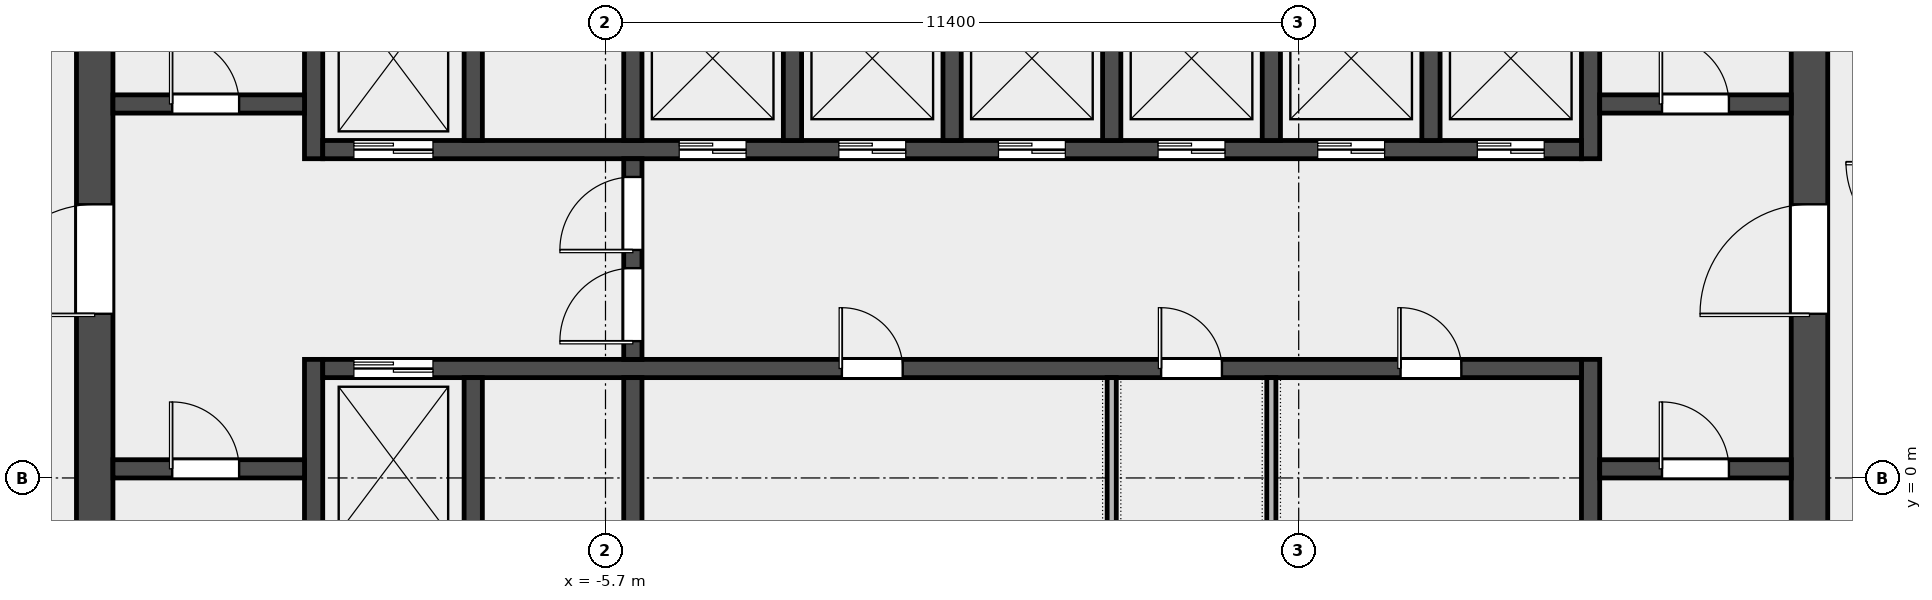
"""IFC4 building model, lengths in metres.
Left out: names, types, materials, properties, quantities, classifications, styles, units other than length and angle.
Written with IfcOpenShell. Run it as: python <this file> out.ifc"""

import sys

from ifc_helpers import new_model, si_unit, direction, frame, frame_2d, origin, place, context, subcontext, project, spatial, rectangle, extrude, element, fill, save


model = new_model("IFC4")
c1 = context("Model", 3, precision=1e-05, world=origin(), true_north=direction((0.0, 1.0)))
c2 = subcontext(c1, "Body", "Model", "MODEL_VIEW")
j1 = project(units=[si_unit("LENGTHUNIT", "METRE"), si_unit("PLANEANGLEUNIT", "RADIAN")], contexts=[c1])
p1 = place(None, origin())
s1 = spatial("IfcSite", under=j1, at=p1, CompositionType="ELEMENT")
p2 = place(p1, origin())
s2 = spatial("IfcBuilding", under=s1, at=p2, CompositionType="ELEMENT")
p3 = place(p2, frame((0.0, 0.0, 299.4)))
s3 = spatial("IfcBuildingStorey", under=s2, at=p3, CompositionType="ELEMENT", Elevation=299.4)
p4 = place(p3, frame((-14.1, -6.6, 0.0), z_axis=(0.0, 0.0, 1.0), x_axis=(0.0, 1.0, 0.0)))
e1 = element("IfcWall", 1, at=p4, inside=s3, PredefinedType="SHEAR", context=c2, shape_type="SweptSolid", body=[
    extrude(rectangle(XDim=19.5, YDim=0.6, at=frame_2d((9.75, 0.0))), origin(), (0.0, 0.0, 1.0), 3.7),
])
p5 = place(p4, frame((9.3, 0.0, 0.0)))
e2 = element("IfcOpeningElement", 2, at=p5, cuts=e1, PredefinedType="OPENING", context=c2, shape_type="SweptSolid", body=[
    extrude(rectangle(XDim=1.8, YDim=2.1, at=frame_2d((0.9, 1.05))), frame((0.0, 0.312, 0.0), z_axis=(0.0, -1.0, 0.0), x_axis=(1.0, 0.0, 0.0)), (0.0, 0.0, 1.0), 0.624),
])
p6 = place(p3, frame((14.1, -6.6, 0.0), z_axis=(0.0, 0.0, 1.0), x_axis=(0.0, 1.0, 0.0)))
e3 = element("IfcWall", 3, at=p6, inside=s3, PredefinedType="SHEAR", context=c2, shape_type="SweptSolid", body=[
    extrude(rectangle(XDim=19.5, YDim=0.6, at=frame_2d((9.75, 0.0))), origin(), (0.0, 0.0, 1.0), 3.7),
])
p7 = place(p6, frame((9.3, 0.0, 0.0)))
e4 = element("IfcOpeningElement", 4, at=p7, cuts=e3, PredefinedType="OPENING", context=c2, shape_type="SweptSolid", body=[
    extrude(rectangle(XDim=1.8, YDim=2.1, at=frame_2d((0.9, 1.05))), frame((0.0, 0.312, 0.0), z_axis=(0.0, -1.0, 0.0), x_axis=(1.0, 0.0, 0.0)), (0.0, 0.0, 1.0), 0.624),
])
p8 = place(p3, frame((-10.5, -6.6, 0.0), z_axis=(0.0, 0.0, 1.0), x_axis=(0.0, 1.0, 0.0)))
e5 = element("IfcWall", 5, at=p8, inside=s3, PredefinedType="SHEAR", context=c2, shape_type="SweptSolid", body=[
    extrude(rectangle(XDim=8.55, YDim=0.3, at=frame_2d((4.275, 0.0))), origin(), (0.0, 0.0, 1.0), 3.7),
])
p9 = place(p3, frame((-10.5, 5.25, 0.0), z_axis=(0.0, 0.0, 1.0), x_axis=(0.0, 1.0, 0.0)))
e6 = element("IfcWall", 6, at=p9, inside=s3, PredefinedType="SHEAR", context=c2, shape_type="SweptSolid", body=[
    extrude(rectangle(XDim=7.65, YDim=0.3, at=frame_2d((3.825, 0.0))), origin(), (0.0, 0.0, 1.0), 3.7),
])
p10 = place(p3, frame((10.5, -6.6, 0.0), z_axis=(0.0, 0.0, 1.0), x_axis=(0.0, 1.0, 0.0)))
e7 = element("IfcWall", 7, at=p10, inside=s3, PredefinedType="SHEAR", context=c2, shape_type="SweptSolid", body=[
    extrude(rectangle(XDim=8.55, YDim=0.3, at=frame_2d((4.275, 0.0))), origin(), (0.0, 0.0, 1.0), 3.7),
])
p11 = place(p3, frame((10.5, 5.25, 0.0), z_axis=(0.0, 0.0, 1.0), x_axis=(0.0, 1.0, 0.0)))
e8 = element("IfcWall", 8, at=p11, inside=s3, PredefinedType="SHEAR", context=c2, shape_type="SweptSolid", body=[
    extrude(rectangle(XDim=7.65, YDim=0.3, at=frame_2d((3.825, 0.0))), origin(), (0.0, 0.0, 1.0), 3.7),
])
p12 = place(p3, frame((-13.8, 0.15, 0.0), z_axis=(0.0, 0.0, 1.0), x_axis=(1.0, 0.0, 0.0)))
e9 = element("IfcWall", 9, at=p12, inside=s3, PredefinedType="SOLIDWALL", context=c2, shape_type="SweptSolid", body=[
    extrude(rectangle(XDim=3.15, YDim=0.3, at=frame_2d((1.575, 0.0))), origin(), (0.0, 0.0, 1.0), 3.7),
])
p13 = place(p12, frame((0.975, 0.0, 0.0)))
e10 = element("IfcOpeningElement", 10, at=p13, cuts=e9, PredefinedType="OPENING", context=c2, shape_type="SweptSolid", body=[
    extrude(rectangle(XDim=1.1, YDim=2.1, at=frame_2d((0.55, 1.05))), frame((0.0, 0.162, 0.0), z_axis=(0.0, -1.0, 0.0), x_axis=(1.0, 0.0, 0.0)), (0.0, 0.0, 1.0), 0.324),
])
p14 = place(p3, frame((-13.8, 6.15, 0.0), z_axis=(0.0, 0.0, 1.0), x_axis=(1.0, 0.0, 0.0)))
e11 = element("IfcWall", 11, at=p14, inside=s3, PredefinedType="SOLIDWALL", context=c2, shape_type="SweptSolid", body=[
    extrude(rectangle(XDim=3.15, YDim=0.3, at=frame_2d((1.575, 0.0))), origin(), (0.0, 0.0, 1.0), 3.7),
])
p15 = place(p14, frame((0.975, 0.0, 0.0)))
e12 = element("IfcOpeningElement", 12, at=p15, cuts=e11, PredefinedType="OPENING", context=c2, shape_type="SweptSolid", body=[
    extrude(rectangle(XDim=1.1, YDim=2.1, at=frame_2d((0.55, 1.05))), frame((0.0, 0.162, 0.0), z_axis=(0.0, -1.0, 0.0), x_axis=(1.0, 0.0, 0.0)), (0.0, 0.0, 1.0), 0.324),
])
p16 = place(p3, frame((10.65, 0.15, 0.0), z_axis=(0.0, 0.0, 1.0), x_axis=(1.0, 0.0, 0.0)))
e13 = element("IfcWall", 13, at=p16, inside=s3, PredefinedType="SOLIDWALL", context=c2, shape_type="SweptSolid", body=[
    extrude(rectangle(XDim=3.15, YDim=0.3, at=frame_2d((1.575, 0.0))), origin(), (0.0, 0.0, 1.0), 3.7),
])
p17 = place(p16, frame((1.025, 0.0, 0.0)))
e14 = element("IfcOpeningElement", 14, at=p17, cuts=e13, PredefinedType="OPENING", context=c2, shape_type="SweptSolid", body=[
    extrude(rectangle(XDim=1.1, YDim=2.1, at=frame_2d((0.55, 1.05))), frame((0.0, 0.162, 0.0), z_axis=(0.0, -1.0, 0.0), x_axis=(1.0, 0.0, 0.0)), (0.0, 0.0, 1.0), 0.324),
])
p18 = place(p3, frame((10.65, 6.15, 0.0), z_axis=(0.0, 0.0, 1.0), x_axis=(1.0, 0.0, 0.0)))
e15 = element("IfcWall", 15, at=p18, inside=s3, PredefinedType="SOLIDWALL", context=c2, shape_type="SweptSolid", body=[
    extrude(rectangle(XDim=3.15, YDim=0.3, at=frame_2d((1.575, 0.0))), origin(), (0.0, 0.0, 1.0), 3.7),
])
p19 = place(p18, frame((1.025, 0.0, 0.0)))
e16 = element("IfcOpeningElement", 16, at=p19, cuts=e15, PredefinedType="OPENING", context=c2, shape_type="SweptSolid", body=[
    extrude(rectangle(XDim=1.1, YDim=2.1, at=frame_2d((0.55, 1.05))), frame((0.0, 0.162, 0.0), z_axis=(0.0, -1.0, 0.0), x_axis=(1.0, 0.0, 0.0)), (0.0, 0.0, 1.0), 0.324),
])
p20 = place(p3, frame((-10.35, 1.8, 0.0), z_axis=(0.0, 0.0, 1.0), x_axis=(1.0, 0.0, 0.0)))
e17 = element("IfcWall", 17, at=p20, inside=s3, PredefinedType="SOLIDWALL", context=c2, shape_type="SweptSolid", body=[
    extrude(rectangle(XDim=20.7, YDim=0.3, at=frame_2d((10.35, 0.0))), origin(), (0.0, 0.0, 1.0), 3.7),
])
p21 = place(p20, frame((0.512, 0.0, 0.0)))
e18 = element("IfcOpeningElement", 18, at=p21, cuts=e17, PredefinedType="OPENING", context=c2, shape_type="SweptSolid", body=[
    extrude(rectangle(XDim=1.3, YDim=2.1, at=frame_2d((0.65, 1.05))), frame((0.0, 0.162, 0.0), z_axis=(0.0, -1.0, 0.0), x_axis=(1.0, 0.0, 0.0)), (0.0, 0.0, 1.0), 0.324),
])
p22 = place(p20, frame((8.538, 0.0, 0.0)))
e19 = element("IfcOpeningElement", 19, at=p22, cuts=e17, PredefinedType="OPENING", context=c2, shape_type="SweptSolid", body=[
    extrude(rectangle(XDim=1.0, YDim=2.1, at=frame_2d((0.5, 1.05))), frame((0.0, 0.162, 0.0), z_axis=(0.0, -1.0, 0.0), x_axis=(1.0, 0.0, 0.0)), (0.0, 0.0, 1.0), 0.324),
])
p23 = place(p20, frame((13.788, 0.0, 0.0)))
e20 = element("IfcOpeningElement", 20, at=p23, cuts=e17, PredefinedType="OPENING", context=c2, shape_type="SweptSolid", body=[
    extrude(rectangle(XDim=1.0, YDim=2.1, at=frame_2d((0.5, 1.05))), frame((0.0, 0.162, 0.0), z_axis=(0.0, -1.0, 0.0), x_axis=(1.0, 0.0, 0.0)), (0.0, 0.0, 1.0), 0.324),
])
p24 = place(p20, frame((17.725, 0.0, 0.0)))
e21 = element("IfcOpeningElement", 21, at=p24, cuts=e17, PredefinedType="OPENING", context=c2, shape_type="SweptSolid", body=[
    extrude(rectangle(XDim=1.0, YDim=2.1, at=frame_2d((0.5, 1.05))), frame((0.0, 0.162, 0.0), z_axis=(0.0, -1.0, 0.0), x_axis=(1.0, 0.0, 0.0)), (0.0, 0.0, 1.0), 0.324),
])
p25 = place(p3, frame((-10.35, 5.4, 0.0), z_axis=(0.0, 0.0, 1.0), x_axis=(1.0, 0.0, 0.0)))
e22 = element("IfcWall", 22, at=p25, inside=s3, PredefinedType="SOLIDWALL", context=c2, shape_type="SweptSolid", body=[
    extrude(rectangle(XDim=20.7, YDim=0.3, at=frame_2d((10.35, 0.0))), origin(), (0.0, 0.0, 1.0), 3.7),
])
p26 = place(p25, frame((0.512, 0.0, 0.0)))
e23 = element("IfcOpeningElement", 23, at=p26, cuts=e22, PredefinedType="OPENING", context=c2, shape_type="SweptSolid", body=[
    extrude(rectangle(XDim=1.3, YDim=2.1, at=frame_2d((0.65, 1.05))), frame((0.0, 0.162, 0.0), z_axis=(0.0, -1.0, 0.0), x_axis=(1.0, 0.0, 0.0)), (0.0, 0.0, 1.0), 0.324),
])
p27 = place(p25, frame((5.863, 0.0, 0.0)))
e24 = element("IfcOpeningElement", 24, at=p27, cuts=e22, PredefinedType="OPENING", context=c2, shape_type="SweptSolid", body=[
    extrude(rectangle(XDim=1.1, YDim=2.1, at=frame_2d((0.55, 1.05))), frame((0.0, 0.162, 0.0), z_axis=(0.0, -1.0, 0.0), x_axis=(1.0, 0.0, 0.0)), (0.0, 0.0, 1.0), 0.324),
])
p28 = place(p25, frame((8.488, 0.0, 0.0)))
e25 = element("IfcOpeningElement", 25, at=p28, cuts=e22, PredefinedType="OPENING", context=c2, shape_type="SweptSolid", body=[
    extrude(rectangle(XDim=1.1, YDim=2.1, at=frame_2d((0.55, 1.05))), frame((0.0, 0.162, 0.0), z_axis=(0.0, -1.0, 0.0), x_axis=(1.0, 0.0, 0.0)), (0.0, 0.0, 1.0), 0.324),
])
p29 = place(p25, frame((11.113, 0.0, 0.0)))
e26 = element("IfcOpeningElement", 26, at=p29, cuts=e22, PredefinedType="OPENING", context=c2, shape_type="SweptSolid", body=[
    extrude(rectangle(XDim=1.1, YDim=2.1, at=frame_2d((0.55, 1.05))), frame((0.0, 0.162, 0.0), z_axis=(0.0, -1.0, 0.0), x_axis=(1.0, 0.0, 0.0)), (0.0, 0.0, 1.0), 0.324),
])
p30 = place(p25, frame((13.738, 0.0, 0.0)))
e27 = element("IfcOpeningElement", 27, at=p30, cuts=e22, PredefinedType="OPENING", context=c2, shape_type="SweptSolid", body=[
    extrude(rectangle(XDim=1.1, YDim=2.1, at=frame_2d((0.55, 1.05))), frame((0.0, 0.162, 0.0), z_axis=(0.0, -1.0, 0.0), x_axis=(1.0, 0.0, 0.0)), (0.0, 0.0, 1.0), 0.324),
])
p31 = place(p25, frame((16.363, 0.0, 0.0)))
e28 = element("IfcOpeningElement", 28, at=p31, cuts=e22, PredefinedType="OPENING", context=c2, shape_type="SweptSolid", body=[
    extrude(rectangle(XDim=1.1, YDim=2.1, at=frame_2d((0.55, 1.05))), frame((0.0, 0.162, 0.0), z_axis=(0.0, -1.0, 0.0), x_axis=(1.0, 0.0, 0.0)), (0.0, 0.0, 1.0), 0.324),
])
p32 = place(p25, frame((18.988, 0.0, 0.0)))
e29 = element("IfcOpeningElement", 29, at=p32, cuts=e22, PredefinedType="OPENING", context=c2, shape_type="SweptSolid", body=[
    extrude(rectangle(XDim=1.1, YDim=2.1, at=frame_2d((0.55, 1.05))), frame((0.0, 0.162, 0.0), z_axis=(0.0, -1.0, 0.0), x_axis=(1.0, 0.0, 0.0)), (0.0, 0.0, 1.0), 0.324),
])
for number, where, z_axis, x_axis in (
    (30, (-7.875, -1.05, 0.0), (0.0, 0.0, 1.0), (0.0, 1.0, 0.0)),
    (31, (-5.25, -1.05, 0.0), (0.0, 0.0, 1.0), (0.0, 1.0, 0.0)),
    (32, (-7.875, 5.55, 0.0), (0.0, 0.0, 1.0), (0.0, 1.0, 0.0)),
    (33, (-5.25, 5.55, 0.0), (0.0, 0.0, 1.0), (0.0, 1.0, 0.0)),
    (34, (-2.625, 5.55, 0.0), (0.0, 0.0, 1.0), (0.0, 1.0, 0.0)),
    (35, (0.0, 5.55, 0.0), (0.0, 0.0, 1.0), (0.0, 1.0, 0.0)),
    (36, (2.625, 5.55, 0.0), (0.0, 0.0, 1.0), (0.0, 1.0, 0.0)),
    (37, (5.25, 5.55, 0.0), (0.0, 0.0, 1.0), (0.0, 1.0, 0.0)),
    (38, (7.875, 5.55, 0.0), (0.0, 0.0, 1.0), (0.0, 1.0, 0.0)),
):
    element("IfcWall", number, at=place(p3, frame(where, z_axis=z_axis, x_axis=x_axis)), inside=s3, PredefinedType="SOLIDWALL", context=c2, shape_type="SweptSolid", body=[
        extrude(rectangle(XDim=2.7, YDim=0.3, at=frame_2d((1.35, 0.0))), origin(), (0.0, 0.0, 1.0), 3.7),
    ])
p33 = place(p3, frame((-5.25, 1.95, 0.0), z_axis=(0.0, 0.0, 1.0), x_axis=(0.0, 1.0, 0.0)))
e39 = element("IfcWall", 39, at=p33, inside=s3, PredefinedType="SOLIDWALL", context=c2, shape_type="SweptSolid", body=[
    extrude(rectangle(XDim=3.3, YDim=0.3, at=frame_2d((1.65, 0.0))), origin(), (0.0, 0.0, 1.0), 3.7),
])
p34 = place(p33, frame((0.3, 0.0, 0.0)))
e40 = element("IfcOpeningElement", 40, at=p34, cuts=e39, PredefinedType="OPENING", context=c2, shape_type="SweptSolid", body=[
    extrude(rectangle(XDim=1.2, YDim=2.1, at=frame_2d((0.6, 1.05))), frame((0.0, 0.162, 0.0), z_axis=(0.0, -1.0, 0.0), x_axis=(1.0, 0.0, 0.0)), (0.0, 0.0, 1.0), 0.324),
])
p35 = place(p33, frame((1.8, 0.0, 0.0)))
e41 = element("IfcOpeningElement", 41, at=p35, cuts=e39, PredefinedType="OPENING", context=c2, shape_type="SweptSolid", body=[
    extrude(rectangle(XDim=1.2, YDim=2.1, at=frame_2d((0.6, 1.05))), frame((0.0, 0.162, 0.0), z_axis=(0.0, -1.0, 0.0), x_axis=(1.0, 0.0, 0.0)), (0.0, 0.0, 1.0), 0.324),
])
for number, where, z_axis, x_axis in (
    (42, (2.625, -1.05, 0.0), (0.0, 0.0, 1.0), (0.0, 1.0, 0.0)),
    (43, (5.25, -1.05, 0.0), (0.0, 0.0, 1.0), (0.0, 1.0, 0.0)),
):
    element("IfcWall", number, at=place(p3, frame(where, z_axis=z_axis, x_axis=x_axis)), inside=s3, PredefinedType="PARTITIONING", context=c2, shape_type="SweptSolid", body=[
        extrude(rectangle(XDim=2.7, YDim=0.15, at=frame_2d((1.35, 0.0))), origin(), (0.0, 0.0, 1.0), 3.7),
    ])
p36 = place(p13, origin())
e44 = element("IfcDoor", 44, at=p36, inside=s3, OperationType="SINGLE_SWING_LEFT", PredefinedType="DOOR", context=c2, shape_type="SweptSolid", body=[
    extrude(rectangle(XDim=1.1, YDim=2.1, at=frame_2d((0.55, 1.05))), frame((0.0, 0.025, 0.0), z_axis=(0.0, -1.0, 0.0), x_axis=(1.0, 0.0, 0.0)), (0.0, 0.0, 1.0), 0.05),
])
fill(e10, e44)
p37 = place(p15, origin())
e45 = element("IfcDoor", 45, at=p37, inside=s3, OperationType="SINGLE_SWING_LEFT", PredefinedType="DOOR", context=c2, shape_type="SweptSolid", body=[
    extrude(rectangle(XDim=1.1, YDim=2.1, at=frame_2d((0.55, 1.05))), frame((0.0, 0.025, 0.0), z_axis=(0.0, -1.0, 0.0), x_axis=(1.0, 0.0, 0.0)), (0.0, 0.0, 1.0), 0.05),
])
fill(e12, e45)
p38 = place(p17, origin())
e46 = element("IfcDoor", 46, at=p38, inside=s3, OperationType="SINGLE_SWING_RIGHT", PredefinedType="DOOR", context=c2, shape_type="SweptSolid", body=[
    extrude(rectangle(XDim=1.1, YDim=2.1, at=frame_2d((0.55, 1.05))), frame((0.0, 0.025, 0.0), z_axis=(0.0, -1.0, 0.0), x_axis=(1.0, 0.0, 0.0)), (0.0, 0.0, 1.0), 0.05),
])
fill(e14, e46)
p39 = place(p19, origin())
e47 = element("IfcDoor", 47, at=p39, inside=s3, OperationType="SINGLE_SWING_RIGHT", PredefinedType="DOOR", context=c2, shape_type="SweptSolid", body=[
    extrude(rectangle(XDim=1.1, YDim=2.1, at=frame_2d((0.55, 1.05))), frame((0.0, 0.025, 0.0), z_axis=(0.0, -1.0, 0.0), x_axis=(1.0, 0.0, 0.0)), (0.0, 0.0, 1.0), 0.05),
])
fill(e16, e47)
p40 = place(p5, origin())
e48 = element("IfcDoor", 48, at=p40, inside=s3, OperationType="DOUBLE_DOOR_SINGLE_SWING", PredefinedType="DOOR", context=c2, shape_type="SweptSolid", body=[
    extrude(rectangle(XDim=1.8, YDim=2.1, at=frame_2d((0.9, 1.05))), frame((0.0, 0.025, 0.0), z_axis=(0.0, -1.0, 0.0), x_axis=(1.0, 0.0, 0.0)), (0.0, 0.0, 1.0), 0.05),
])
fill(e2, e48)
p41 = place(p7, origin())
e49 = element("IfcDoor", 49, at=p41, inside=s3, OperationType="DOUBLE_DOOR_SINGLE_SWING", PredefinedType="DOOR", context=c2, shape_type="SweptSolid", body=[
    extrude(rectangle(XDim=1.8, YDim=2.1, at=frame_2d((0.9, 1.05))), frame((0.0, 0.025, 0.0), z_axis=(0.0, -1.0, 0.0), x_axis=(1.0, 0.0, 0.0)), (0.0, 0.0, 1.0), 0.05),
])
fill(e4, e49)
p42 = place(p34, origin())
e50 = element("IfcDoor", 50, at=p42, inside=s3, OperationType="SINGLE_SWING_LEFT", PredefinedType="DOOR", context=c2, shape_type="SweptSolid", body=[
    extrude(rectangle(XDim=1.2, YDim=2.1, at=frame_2d((0.6, 1.05))), frame((0.0, 0.025, 0.0), z_axis=(0.0, -1.0, 0.0), x_axis=(1.0, 0.0, 0.0)), (0.0, 0.0, 1.0), 0.05),
])
fill(e40, e50)
p43 = place(p35, origin())
e51 = element("IfcDoor", 51, at=p43, inside=s3, OperationType="SINGLE_SWING_RIGHT", PredefinedType="DOOR", context=c2, shape_type="SweptSolid", body=[
    extrude(rectangle(XDim=1.2, YDim=2.1, at=frame_2d((0.6, 1.05))), frame((0.0, 0.025, 0.0), z_axis=(0.0, -1.0, 0.0), x_axis=(1.0, 0.0, 0.0)), (0.0, 0.0, 1.0), 0.05),
])
fill(e41, e51)
p44 = place(p21, origin())
e52 = element("IfcDoor", 52, at=p44, inside=s3, OperationType="DOUBLE_DOOR_SLIDING", PredefinedType="DOOR", context=c2, shape_type="SweptSolid", body=[
    extrude(rectangle(XDim=1.3, YDim=2.1, at=frame_2d((0.65, 1.05))), frame((0.0, 0.025, 0.0), z_axis=(0.0, -1.0, 0.0), x_axis=(1.0, 0.0, 0.0)), (0.0, 0.0, 1.0), 0.05),
])
fill(e18, e52)
p45 = place(p26, origin())
e53 = element("IfcDoor", 53, at=p45, inside=s3, OperationType="DOUBLE_DOOR_SLIDING", PredefinedType="DOOR", context=c2, shape_type="SweptSolid", body=[
    extrude(rectangle(XDim=1.3, YDim=2.1, at=frame_2d((0.65, 1.05))), frame((0.0, 0.025, 0.0), z_axis=(0.0, -1.0, 0.0), x_axis=(1.0, 0.0, 0.0)), (0.0, 0.0, 1.0), 0.05),
])
fill(e23, e53)
p46 = place(p27, origin())
e54 = element("IfcDoor", 54, at=p46, inside=s3, OperationType="DOUBLE_DOOR_SLIDING", PredefinedType="DOOR", context=c2, shape_type="SweptSolid", body=[
    extrude(rectangle(XDim=1.1, YDim=2.1, at=frame_2d((0.55, 1.05))), frame((0.0, 0.025, 0.0), z_axis=(0.0, -1.0, 0.0), x_axis=(1.0, 0.0, 0.0)), (0.0, 0.0, 1.0), 0.05),
])
fill(e24, e54)
p47 = place(p28, origin())
e55 = element("IfcDoor", 55, at=p47, inside=s3, OperationType="DOUBLE_DOOR_SLIDING", PredefinedType="DOOR", context=c2, shape_type="SweptSolid", body=[
    extrude(rectangle(XDim=1.1, YDim=2.1, at=frame_2d((0.55, 1.05))), frame((0.0, 0.025, 0.0), z_axis=(0.0, -1.0, 0.0), x_axis=(1.0, 0.0, 0.0)), (0.0, 0.0, 1.0), 0.05),
])
fill(e25, e55)
p48 = place(p29, origin())
e56 = element("IfcDoor", 56, at=p48, inside=s3, OperationType="DOUBLE_DOOR_SLIDING", PredefinedType="DOOR", context=c2, shape_type="SweptSolid", body=[
    extrude(rectangle(XDim=1.1, YDim=2.1, at=frame_2d((0.55, 1.05))), frame((0.0, 0.025, 0.0), z_axis=(0.0, -1.0, 0.0), x_axis=(1.0, 0.0, 0.0)), (0.0, 0.0, 1.0), 0.05),
])
fill(e26, e56)
p49 = place(p30, origin())
e57 = element("IfcDoor", 57, at=p49, inside=s3, OperationType="DOUBLE_DOOR_SLIDING", PredefinedType="DOOR", context=c2, shape_type="SweptSolid", body=[
    extrude(rectangle(XDim=1.1, YDim=2.1, at=frame_2d((0.55, 1.05))), frame((0.0, 0.025, 0.0), z_axis=(0.0, -1.0, 0.0), x_axis=(1.0, 0.0, 0.0)), (0.0, 0.0, 1.0), 0.05),
])
fill(e27, e57)
p50 = place(p31, origin())
e58 = element("IfcDoor", 58, at=p50, inside=s3, OperationType="DOUBLE_DOOR_SLIDING", PredefinedType="DOOR", context=c2, shape_type="SweptSolid", body=[
    extrude(rectangle(XDim=1.1, YDim=2.1, at=frame_2d((0.55, 1.05))), frame((0.0, 0.025, 0.0), z_axis=(0.0, -1.0, 0.0), x_axis=(1.0, 0.0, 0.0)), (0.0, 0.0, 1.0), 0.05),
])
fill(e28, e58)
p51 = place(p32, origin())
e59 = element("IfcDoor", 59, at=p51, inside=s3, OperationType="DOUBLE_DOOR_SLIDING", PredefinedType="DOOR", context=c2, shape_type="SweptSolid", body=[
    extrude(rectangle(XDim=1.1, YDim=2.1, at=frame_2d((0.55, 1.05))), frame((0.0, 0.025, 0.0), z_axis=(0.0, -1.0, 0.0), x_axis=(1.0, 0.0, 0.0)), (0.0, 0.0, 1.0), 0.05),
])
fill(e29, e59)
p52 = place(p22, origin())
e60 = element("IfcDoor", 60, at=p52, inside=s3, OperationType="SINGLE_SWING_LEFT", PredefinedType="DOOR", context=c2, shape_type="SweptSolid", body=[
    extrude(rectangle(XDim=1.0, YDim=2.1, at=frame_2d((0.5, 1.05))), frame((0.0, 0.025, 0.0), z_axis=(0.0, -1.0, 0.0), x_axis=(1.0, 0.0, 0.0)), (0.0, 0.0, 1.0), 0.05),
])
fill(e19, e60)
p53 = place(p23, origin())
e61 = element("IfcDoor", 61, at=p53, inside=s3, OperationType="SINGLE_SWING_LEFT", PredefinedType="DOOR", context=c2, shape_type="SweptSolid", body=[
    extrude(rectangle(XDim=1.0, YDim=2.1, at=frame_2d((0.5, 1.05))), frame((0.0, 0.025, 0.0), z_axis=(0.0, -1.0, 0.0), x_axis=(1.0, 0.0, 0.0)), (0.0, 0.0, 1.0), 0.05),
])
fill(e20, e61)
p54 = place(p24, origin())
e62 = element("IfcDoor", 62, at=p54, inside=s3, OperationType="SINGLE_SWING_LEFT", PredefinedType="DOOR", context=c2, shape_type="SweptSolid", body=[
    extrude(rectangle(XDim=1.0, YDim=2.1, at=frame_2d((0.5, 1.05))), frame((0.0, 0.025, 0.0), z_axis=(0.0, -1.0, 0.0), x_axis=(1.0, 0.0, 0.0)), (0.0, 0.0, 1.0), 0.05),
])
fill(e21, e62)
save(model, sys.argv[1])
